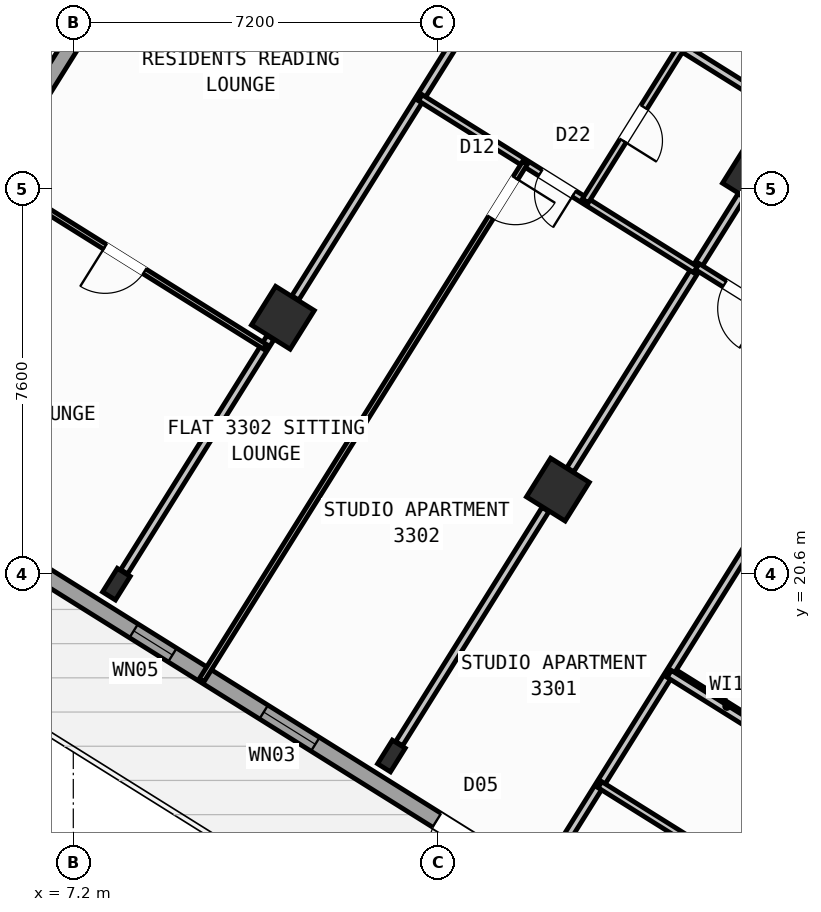
"""IFC4 building model, lengths in metres.
Left out: names, types, materials, properties, quantities, classifications, styles, units other than length and angle.
Written with IfcOpenShell. Run it as: python <this file> out.ifc"""

import sys

from ifc_helpers import new_model, si_unit, direction, frame, frame_2d, origin, origin_2d, place, context, subcontext, project, spatial, rectangle, hollow_rectangle, i_section, extrude, source, transform, mapped, element, fill, save


model = new_model("IFC4")
c1 = context("Model", 3, precision=1e-05, world=origin(), true_north=direction((0.0, 1.0)))
c2 = subcontext(c1, "Body", "Model", "MODEL_VIEW")
j1 = project(units=[si_unit("LENGTHUNIT", "METRE"), si_unit("PLANEANGLEUNIT", "RADIAN")], contexts=[c1])
p1 = place(None, origin())
s1 = spatial("IfcSite", under=j1, at=p1, CompositionType="ELEMENT")
p2 = place(p1, origin())
s2 = spatial("IfcBuilding", under=s1, at=p2, CompositionType="ELEMENT")
p3 = place(p2, frame((0.0, 0.0, 132.6)))
s3 = spatial("IfcBuildingStorey", under=s2, at=p3, CompositionType="ELEMENT", Elevation=132.6)
m1 = source(origin(), c2, "Body", "SweptSolid", [
    extrude(hollow_rectangle(XDim=0.9, YDim=0.9, WallThickness=0.036, at=origin_2d()), origin(), (0.0, 0.0, 1.0), 3.6),
])
for number, where, z_axis, x_axis in (
    (1, (20.632, 28.452, 0.0), (0.0, 0.0, 1.0), (-0.848, 0.53, 0.0)),
    (2, (16.764, 22.261, 0.0), (0.0, 0.0, 1.0), (-0.848, 0.53, 0.0)),
):
    element("IfcColumn", number, at=place(p3, frame(where, z_axis=z_axis, x_axis=x_axis)), inside=s3, PredefinedType="COLUMN", context=c2, shape_type="MappedRepresentation", body=[
        mapped(m1, transform((0.0, 0.0, 0.0), scale=1.0)),
    ])
m2 = source(origin(), c2, "Body", "SweptSolid", [
    extrude(i_section(OverallWidth=0.3, OverallDepth=0.55, WebThickness=0.015, FlangeThickness=0.029, at=origin_2d()), origin(), (0.0, 0.0, 1.0), 3.6),
])
p4 = place(p3, frame((13.478, 17.003, 0.0), z_axis=(0.0, 0.0, 1.0), x_axis=(-0.848048096156, 0.529919264233, 0.0)))
e3 = element("IfcColumn", 3, at=p4, inside=s3, PredefinedType="COLUMN", context=c2, shape_type="MappedRepresentation", body=[
    mapped(m2, transform((0.0, 0.0, 0.0), scale=1.0)),
])
p5 = place(p3, frame((11.336, 25.653, 0.0), z_axis=(0.0, 0.0, 1.0), x_axis=(-0.848048096156, 0.529919264233, 0.0)))
e4 = element("IfcColumn", 4, at=p5, inside=s3, PredefinedType="COLUMN", context=c2, shape_type="MappedRepresentation", body=[
    mapped(m1, transform((0.0, 0.0, 0.0), scale=1.0)),
])
p6 = place(p3, frame((8.051, 20.395, 0.0), z_axis=(0.0, 0.0, 1.0), x_axis=(-0.848048096156, 0.529919264233, 0.0)))
e5 = element("IfcColumn", 5, at=p6, inside=s3, PredefinedType="COLUMN", context=c2, shape_type="MappedRepresentation", body=[
    mapped(m2, transform((0.0, 0.0, 0.0), scale=1.0)),
])
p7 = place(p3, frame((29.268, 6.429, 0.0), z_axis=(0.0, 0.0, 1.0), x_axis=(-0.848049971435, 0.529916263149, 0.0)))
e6 = element("IfcWall", 6, at=p7, inside=s3, PredefinedType="STANDARD", context=c2, shape_type="SweptSolid", body=[
    extrude(rectangle(XDim=31.588, YDim=0.32, at=frame_2d((15.794, 0.0))), origin(), (0.0, 0.0, 1.0), 3.32),
])
p8 = place(p7, frame((16.362, 0.0, 0.0)))
e7 = element("IfcOpeningElement", 7, at=p8, cuts=e6, PredefinedType="OPENING", context=c2, shape_type="SweptSolid", body=[
    extrude(rectangle(XDim=1.2, YDim=2.15, at=frame_2d((0.6, 1.075))), frame((0.0, 0.17, 0.0), z_axis=(0.0, -1.0, 0.0), x_axis=(1.0, 0.0, 0.0)), (0.0, 0.0, 1.0), 0.34),
])
p9 = place(p7, frame((2.989, 0.0, 0.8)))
e8 = element("IfcOpeningElement", 8, at=p9, cuts=e6, PredefinedType="OPENING", context=c2, shape_type="SweptSolid", body=[
    extrude(rectangle(XDim=2.1, YDim=1.55, at=frame_2d((1.05, 0.775))), frame((0.0, 0.17, 0.0), z_axis=(0.0, -1.0, 0.0), x_axis=(1.0, 0.0, 0.0)), (0.0, 0.0, 1.0), 0.34),
])
p10 = place(p7, frame((8.359, 0.0, 0.8)))
e9 = element("IfcOpeningElement", 9, at=p10, cuts=e6, PredefinedType="OPENING", context=c2, shape_type="SweptSolid", body=[
    extrude(rectangle(XDim=2.1, YDim=1.55, at=frame_2d((1.05, 0.775))), frame((0.0, 0.17, 0.0), z_axis=(0.0, -1.0, 0.0), x_axis=(1.0, 0.0, 0.0)), (0.0, 0.0, 1.0), 0.34),
])
p11 = place(p7, frame((13.284, 0.0, 0.95)))
e10 = element("IfcOpeningElement", 10, at=p11, cuts=e6, PredefinedType="OPENING", context=c2, shape_type="SweptSolid", body=[
    extrude(rectangle(XDim=1.2, YDim=1.4, at=frame_2d((0.6, 0.7))), frame((0.0, 0.17, 0.0), z_axis=(0.0, -1.0, 0.0), x_axis=(1.0, 0.0, 0.0)), (0.0, 0.0, 1.0), 0.34),
])
p12 = place(p7, frame((20.39, 0.0, 0.95)))
e11 = element("IfcOpeningElement", 11, at=p12, cuts=e6, PredefinedType="OPENING", context=c2, shape_type="SweptSolid", body=[
    extrude(rectangle(XDim=1.2, YDim=1.4, at=frame_2d((0.6, 0.7))), frame((0.0, 0.17, 0.0), z_axis=(0.0, -1.0, 0.0), x_axis=(1.0, 0.0, 0.0)), (0.0, 0.0, 1.0), 0.34),
])
p13 = place(p7, frame((23.715, 0.0, 1.0)))
e12 = element("IfcOpeningElement", 12, at=p13, cuts=e6, PredefinedType="OPENING", context=c2, shape_type="SweptSolid", body=[
    extrude(rectangle(XDim=0.9, YDim=1.25, at=frame_2d((0.45, 0.625))), frame((0.0, 0.17, 0.0), z_axis=(0.0, -1.0, 0.0), x_axis=(1.0, 0.0, 0.0)), (0.0, 0.0, 1.0), 0.34),
])
p14 = place(p7, frame((27.481, 0.0, 0.8)))
e13 = element("IfcOpeningElement", 13, at=p14, cuts=e6, PredefinedType="OPENING", context=c2, shape_type="SweptSolid", body=[
    extrude(rectangle(XDim=2.1, YDim=1.55, at=frame_2d((1.05, 0.775))), frame((0.0, 0.17, 0.0), z_axis=(0.0, -1.0, 0.0), x_axis=(1.0, 0.0, 0.0)), (0.0, 0.0, 1.0), 0.34),
])
p15 = place(p3, frame((2.415, 23.452, 0.0), z_axis=(0.0, 0.0, 1.0), x_axis=(0.52991049553, 0.848053575387, 0.0)))
e14 = element("IfcWall", 14, at=p15, inside=s3, PredefinedType="STANDARD", context=c2, shape_type="SweptSolid", body=[
    extrude(rectangle(XDim=21.587, YDim=0.32, at=frame_2d((10.794, 0.0))), origin(), (0.0, 0.0, 1.0), 2.745),
])
p16 = place(p15, frame((2.168, 0.0, 0.8)))
e15 = element("IfcOpeningElement", 15, at=p16, cuts=e14, PredefinedType="OPENING", context=c2, shape_type="SweptSolid", body=[
    extrude(rectangle(XDim=2.1, YDim=1.55, at=frame_2d((1.05, 0.775))), frame((0.0, 0.17, 0.0), z_axis=(0.0, -1.0, 0.0), x_axis=(1.0, 0.0, 0.0)), (0.0, 0.0, 1.0), 0.34),
])
p17 = place(p15, frame((9.344, 0.0, 0.85)))
e16 = element("IfcOpeningElement", 16, at=p17, cuts=e14, PredefinedType="OPENING", context=c2, shape_type="SweptSolid", body=[
    extrude(rectangle(XDim=1.8, YDim=1.5, at=frame_2d((0.9, 0.75))), frame((0.0, 0.17, 0.0), z_axis=(0.0, -1.0, 0.0), x_axis=(1.0, 0.0, 0.0)), (0.0, 0.0, 1.0), 0.34),
])
p18 = place(p15, frame((18.459, 0.0, 0.85)))
e17 = element("IfcOpeningElement", 17, at=p18, cuts=e14, PredefinedType="OPENING", context=c2, shape_type="SweptSolid", body=[
    extrude(rectangle(XDim=1.5, YDim=1.5, at=frame_2d((0.75, 0.75))), frame((0.0, 0.17, 0.0), z_axis=(0.0, -1.0, 0.0), x_axis=(1.0, 0.0, 0.0)), (0.0, 0.0, 1.0), 0.34),
])
p19 = place(p3, frame((14.138, 41.825, 0.0), z_axis=(0.0, 0.0, 1.0), x_axis=(0.848046498049, -0.529921821731, 0.0)))
e18 = element("IfcWall", 18, at=p19, inside=s3, PredefinedType="STANDARD", context=c2, shape_type="SweptSolid", body=[
    extrude(rectangle(XDim=31.588, YDim=0.32, at=frame_2d((15.794, 0.0))), origin(), (0.0, 0.0, 1.0), 3.32),
])
p20 = place(p19, frame((3.253, 0.0, 0.0)))
e19 = element("IfcOpeningElement", 19, at=p20, cuts=e18, PredefinedType="OPENING", context=c2, shape_type="SweptSolid", body=[
    extrude(rectangle(XDim=1.05, YDim=2.15, at=frame_2d((0.525, 1.075))), frame((0.0, 0.17, 0.0), z_axis=(0.0, -1.0, 0.0), x_axis=(1.0, 0.0, 0.0)), (0.0, 0.0, 1.0), 0.34),
])
p21 = place(p19, frame((0.863, 0.0, 0.85)))
e20 = element("IfcOpeningElement", 20, at=p21, cuts=e18, PredefinedType="OPENING", context=c2, shape_type="SweptSolid", body=[
    extrude(rectangle(XDim=1.8, YDim=1.5, at=frame_2d((0.9, 0.75))), frame((0.0, 0.17, 0.0), z_axis=(0.0, -1.0, 0.0), x_axis=(1.0, 0.0, 0.0)), (0.0, 0.0, 1.0), 0.34),
])
p22 = place(p19, frame((8.435, 0.0, 0.85)))
e21 = element("IfcOpeningElement", 21, at=p22, cuts=e18, PredefinedType="OPENING", context=c2, shape_type="SweptSolid", body=[
    extrude(rectangle(XDim=1.8, YDim=1.5, at=frame_2d((0.9, 0.75))), frame((0.0, 0.17, 0.0), z_axis=(0.0, -1.0, 0.0), x_axis=(1.0, 0.0, 0.0)), (0.0, 0.0, 1.0), 0.34),
])
p23 = place(p19, frame((13.874, 0.0, 0.85)))
e22 = element("IfcOpeningElement", 22, at=p23, cuts=e18, PredefinedType="OPENING", context=c2, shape_type="SweptSolid", body=[
    extrude(rectangle(XDim=1.5, YDim=1.5, at=frame_2d((0.75, 0.75))), frame((0.0, 0.17, 0.0), z_axis=(0.0, -1.0, 0.0), x_axis=(1.0, 0.0, 0.0)), (0.0, 0.0, 1.0), 0.34),
])
p24 = place(p19, frame((17.104, 0.0, 1.0)))
e23 = element("IfcOpeningElement", 23, at=p24, cuts=e18, PredefinedType="OPENING", context=c2, shape_type="SweptSolid", body=[
    extrude(rectangle(XDim=0.9, YDim=1.25, at=frame_2d((0.45, 0.625))), frame((0.0, 0.17, 0.0), z_axis=(0.0, -1.0, 0.0), x_axis=(1.0, 0.0, 0.0)), (0.0, 0.0, 1.0), 0.34),
])
p25 = place(p19, frame((22.131, 0.0, 1.0)))
e24 = element("IfcOpeningElement", 24, at=p25, cuts=e18, PredefinedType="OPENING", context=c2, shape_type="SweptSolid", body=[
    extrude(rectangle(XDim=0.9, YDim=1.25, at=frame_2d((0.45, 0.625))), frame((0.0, 0.17, 0.0), z_axis=(0.0, -1.0, 0.0), x_axis=(1.0, 0.0, 0.0)), (0.0, 0.0, 1.0), 0.34),
])
p26 = place(p19, frame((27.706, 0.0, 1.0)))
e25 = element("IfcOpeningElement", 25, at=p26, cuts=e18, PredefinedType="OPENING", context=c2, shape_type="SweptSolid", body=[
    extrude(rectangle(XDim=0.9, YDim=1.25, at=frame_2d((0.45, 0.625))), frame((0.0, 0.17, 0.0), z_axis=(0.0, -1.0, 0.0), x_axis=(1.0, 0.0, 0.0)), (0.0, 0.0, 1.0), 0.34),
])
p27 = place(p3, frame((21.206, 17.292, 0.0), z_axis=(0.0, 0.0, 1.0), x_axis=(-0.848050851465, 0.529914854792, 0.0)))
e26 = element("IfcWall", 26, at=p27, inside=s3, PredefinedType="PARTITIONING", context=c2, shape_type="SweptSolid", body=[
    extrude(rectangle(XDim=2.61, YDim=0.16, at=frame_2d((1.305, 0.0))), origin(), (0.0, 0.0, 1.0), 3.31),
])
p28 = place(p3, frame((24.588, 27.631, 0.0), z_axis=(0.0, 0.0, 1.0), x_axis=(-0.529914586043, -0.848051019396, 0.0)))
e27 = element("IfcWall", 27, at=p28, inside=s3, PredefinedType="PARTITIONING", context=c2, shape_type="SweptSolid", body=[
    extrude(rectangle(XDim=15.35, YDim=0.16, at=frame_2d((7.675, 0.0))), origin(), (0.0, 0.0, 1.0), 3.31),
])
p29 = place(p3, frame((25.754, 29.497, 0.0), z_axis=(0.0, 0.0, 1.0), x_axis=(-0.848045850158, 0.529922858565, 0.0)))
e28 = element("IfcWall", 28, at=p29, inside=s3, PredefinedType="PARTITIONING", context=c2, shape_type="SweptSolid", body=[
    extrude(rectangle(XDim=16.73, YDim=0.16, at=frame_2d((8.365, 0.0))), origin(), (0.0, 0.0, 1.0), 3.31),
])
p30 = place(p29, frame((1.588, 0.0, 0.0)))
e29 = element("IfcOpeningElement", 29, at=p30, cuts=e28, PredefinedType="OPENING", context=c2, shape_type="SweptSolid", body=[
    extrude(rectangle(XDim=1.0, YDim=2.1, at=frame_2d((0.5, 1.05))), frame((0.0, 0.09, 0.0), z_axis=(0.0, -1.0, 0.0), x_axis=(1.0, 0.0, 0.0)), (0.0, 0.0, 1.0), 0.18),
])
p31 = place(p29, frame((6.685, 0.0, 0.0)))
e30 = element("IfcOpeningElement", 30, at=p31, cuts=e28, PredefinedType="OPENING", context=c2, shape_type="SweptSolid", body=[
    extrude(rectangle(XDim=1.0, YDim=2.1, at=frame_2d((0.5, 1.05))), frame((0.0, 0.09, 0.0), z_axis=(0.0, -1.0, 0.0), x_axis=(1.0, 0.0, 0.0)), (0.0, 0.0, 1.0), 0.18),
])
p32 = place(p29, frame((12.951, 0.0, 0.0)))
e31 = element("IfcOpeningElement", 31, at=p32, cuts=e28, PredefinedType="OPENING", context=c2, shape_type="SweptSolid", body=[
    extrude(rectangle(XDim=1.0, YDim=2.1, at=frame_2d((0.5, 1.05))), frame((0.0, 0.09, 0.0), z_axis=(0.0, -1.0, 0.0), x_axis=(1.0, 0.0, 0.0)), (0.0, 0.0, 1.0), 0.18),
])
p33 = place(p3, frame((24.588, 27.631, 0.0), z_axis=(0.0, 0.0, 1.0), x_axis=(-0.848041752158, 0.529929416617, 0.0)))
e32 = element("IfcWall", 32, at=p33, inside=s3, PredefinedType="PARTITIONING", context=c2, shape_type="SweptSolid", body=[
    extrude(rectangle(XDim=16.73, YDim=0.16, at=frame_2d((8.365, 0.0))), origin(), (0.0, 0.0, 1.0), 3.31),
])
p34 = place(p33, frame((2.22, 0.0, 0.0)))
e33 = element("IfcOpeningElement", 33, at=p34, cuts=e32, PredefinedType="OPENING", context=c2, shape_type="SweptSolid", body=[
    extrude(rectangle(XDim=0.86, YDim=2.05, at=frame_2d((0.43, 1.025))), frame((0.0, 0.09, 0.0), z_axis=(0.0, -1.0, 0.0), x_axis=(1.0, 0.0, 0.0)), (0.0, 0.0, 1.0), 0.18),
])
p35 = place(p33, frame((7.82, 0.0, 0.0)))
e34 = element("IfcOpeningElement", 34, at=p35, cuts=e32, PredefinedType="OPENING", context=c2, shape_type="SweptSolid", body=[
    extrude(rectangle(XDim=1.0, YDim=2.1, at=frame_2d((0.5, 1.05))), frame((0.0, 0.09, 0.0), z_axis=(0.0, -1.0, 0.0), x_axis=(1.0, 0.0, 0.0)), (0.0, 0.0, 1.0), 0.18),
])
p36 = place(p33, frame((12.95, 0.0, 0.0)))
e35 = element("IfcOpeningElement", 35, at=p36, cuts=e32, PredefinedType="OPENING", context=c2, shape_type="SweptSolid", body=[
    extrude(rectangle(XDim=1.0, YDim=2.1, at=frame_2d((0.5, 1.05))), frame((0.0, 0.09, 0.0), z_axis=(0.0, -1.0, 0.0), x_axis=(1.0, 0.0, 0.0)), (0.0, 0.0, 1.0), 0.18),
])
p37 = place(p3, frame((20.387, 28.06, 0.0), z_axis=(0.0, 0.0, 1.0), x_axis=(-0.529902564924, -0.848058530814, 0.0)))
e36 = element("IfcWall", 36, at=p37, inside=s3, PredefinedType="PARTITIONING", context=c2, shape_type="SweptSolid", body=[
    extrude(rectangle(XDim=6.376, YDim=0.16, at=frame_2d((3.188, 0.0))), origin(), (0.0, 0.0, 1.0), 2.745),
])
p38 = place(p3, frame((16.519, 21.87, 0.0), z_axis=(0.0, 0.0, 1.0), x_axis=(-0.529922447305, -0.848046107144, 0.0)))
e37 = element("IfcWall", 37, at=p38, inside=s3, PredefinedType="PARTITIONING", context=c2, shape_type="SweptSolid", body=[
    extrude(rectangle(XDim=5.451, YDim=0.16, at=frame_2d((2.726, 0.0))), origin(), (0.0, 0.0, 1.0), 2.745),
])
p39 = place(p3, frame((22.728, 24.654, 0.0), z_axis=(0.0, 0.0, 1.0), x_axis=(-0.848059820872, 0.529900500304, 0.0)))
e38 = element("IfcWall", 38, at=p39, inside=s3, PredefinedType="PLUMBINGWALL", context=c2, shape_type="SweptSolid", body=[
    extrude(rectangle(XDim=3.79, YDim=0.14, at=frame_2d((1.895, 0.0))), origin(), (0.0, 0.0, 1.0), 3.31),
])
p40 = place(p39, frame((2.23, 0.0, 0.0)))
e39 = element("IfcOpeningElement", 39, at=p40, cuts=e38, PredefinedType="OPENING", context=c2, shape_type="SweptSolid", body=[
    extrude(rectangle(XDim=0.92, YDim=2.08, at=frame_2d((0.46, 1.04))), frame((0.0, 0.08, 0.0), z_axis=(0.0, -1.0, 0.0), x_axis=(1.0, 0.0, 0.0)), (0.0, 0.0, 1.0), 0.16),
])
p41 = place(p3, frame((14.96, 31.452, 0.0), z_axis=(0.0, 0.0, 1.0), x_axis=(-0.529947310719, -0.848030570122, 0.0)))
e40 = element("IfcWall", 40, at=p41, inside=s3, PredefinedType="PARTITIONING", context=c2, shape_type="SweptSolid", body=[
    extrude(rectangle(XDim=6.376, YDim=0.16, at=frame_2d((3.188, 0.0))), origin(), (0.0, 0.0, 1.0), 2.745),
])
p42 = place(p3, frame((11.091, 25.261, 0.0), z_axis=(0.0, 0.0, 1.0), x_axis=(-0.52994257524, -0.848033529377, 0.0)))
e41 = element("IfcWall", 41, at=p42, inside=s3, PredefinedType="PARTITIONING", context=c2, shape_type="SweptSolid", body=[
    extrude(rectangle(XDim=5.451, YDim=0.16, at=frame_2d((2.726, 0.0))), origin(), (0.0, 0.0, 1.0), 2.745),
])
p43 = place(p3, frame((19.477, 26.603, 0.0), z_axis=(0.0, 0.0, 1.0), x_axis=(-0.848039019877, 0.529933789039, 0.0)))
e42 = element("IfcWall", 42, at=p43, inside=s3, PredefinedType="PLUMBINGWALL", context=c2, shape_type="SweptSolid", body=[
    extrude(rectangle(XDim=6.4, YDim=0.14, at=frame_2d((3.2, 0.0))), origin(), (0.0, 0.0, 1.0), 3.31),
])
p44 = place(p43, frame((2.824, 0.0, 0.0)))
e43 = element("IfcOpeningElement", 43, at=p44, cuts=e42, PredefinedType="OPENING", context=c2, shape_type="SweptSolid", body=[
    extrude(rectangle(XDim=0.78, YDim=2.05, at=frame_2d((0.39, 1.025))), frame((0.0, 0.08, 0.0), z_axis=(0.0, -1.0, 0.0), x_axis=(1.0, 0.0, 0.0)), (0.0, 0.0, 1.0), 0.16),
])
p45 = place(p3, frame((19.203, 30.996, 0.0), z_axis=(0.0, 0.0, 1.0), x_axis=(-0.529906983049, -0.848055770169, 0.0)))
e44 = element("IfcWall", 44, at=p45, inside=s3, PredefinedType="PLUMBINGWALL", context=c2, shape_type="SweptSolid", body=[
    extrude(rectangle(XDim=3.58, YDim=0.14, at=frame_2d((1.79, 0.0))), origin(), (0.0, 0.0, 1.0), 3.31),
])
p46 = place(p45, frame((1.4, 0.0, 0.0)))
e45 = element("IfcOpeningElement", 45, at=p46, cuts=e44, PredefinedType="OPENING", context=c2, shape_type="SweptSolid", body=[
    extrude(rectangle(XDim=0.78, YDim=2.05, at=frame_2d((0.39, 1.025))), frame((0.0, 0.08, 0.0), z_axis=(0.0, -1.0, 0.0), x_axis=(1.0, 0.0, 0.0)), (0.0, 0.0, 1.0), 0.16),
])
p47 = place(p3, frame((16.112, 28.706, 0.0), z_axis=(0.0, 0.0, 1.0), x_axis=(-0.529929676091, -0.848041590017, 0.0)))
e46 = element("IfcWall", 46, at=p47, inside=s3, PredefinedType="PARTITIONING", context=c2, shape_type="SweptSolid", body=[
    extrude(rectangle(XDim=12.04, YDim=0.11, at=frame_2d((6.02, 0.0))), origin(), (0.0, 0.0, 1.0), 3.31),
])
p48 = place(p47, frame((0.35, 0.0, 0.0)))
e47 = element("IfcOpeningElement", 47, at=p48, cuts=e46, PredefinedType="OPENING", context=c2, shape_type="SweptSolid", body=[
    extrude(rectangle(XDim=0.92, YDim=2.08, at=frame_2d((0.46, 1.04))), frame((0.0, 0.065, 0.0), z_axis=(0.0, -1.0, 0.0), x_axis=(1.0, 0.0, 0.0)), (0.0, 0.0, 1.0), 0.13),
])
p49 = place(p3, frame((10.98, 25.083, 0.0), z_axis=(0.0, 0.0, 1.0), x_axis=(-0.848048787466, 0.529918157905, 0.0)))
e48 = element("IfcWall", 48, at=p49, inside=s3, PredefinedType="PARTITIONING", context=c2, shape_type="SweptSolid", body=[
    extrude(rectangle(XDim=6.52, YDim=0.11, at=frame_2d((3.26, 0.0))), origin(), (0.0, 0.0, 1.0), 3.31),
])
p50 = place(p49, frame((2.8, 0.0, 0.0)))
e49 = element("IfcOpeningElement", 49, at=p50, cuts=e48, PredefinedType="OPENING", context=c2, shape_type="SweptSolid", body=[
    extrude(rectangle(XDim=0.92, YDim=2.08, at=frame_2d((0.46, 1.04))), frame((0.0, 0.065, 0.0), z_axis=(0.0, -1.0, 0.0), x_axis=(1.0, 0.0, 0.0)), (0.0, 0.0, 1.0), 0.13),
])
p51 = place(p3, frame((32.164, 10.374, 0.0), z_axis=(0.0, 0.0, 1.0), x_axis=(-0.848044107957, 0.529925646633, 0.0)))
e50 = element("IfcWall", 50, at=p51, inside=s3, PredefinedType="PARTITIONING", context=c2, shape_type="SweptSolid", body=[
    extrude(rectangle(XDim=15.57, YDim=0.16, at=frame_2d((7.785, 0.0))), origin(), (0.0, 0.0, 1.0), 3.31),
])
p52 = place(p51, frame((10.83, 0.0, 0.0)))
e51 = element("IfcOpeningElement", 51, at=p52, cuts=e50, PredefinedType="OPENING", context=c2, shape_type="SweptSolid", body=[
    extrude(rectangle(XDim=1.0, YDim=2.1, at=frame_2d((0.5, 1.05))), frame((0.0, 0.09, 0.0), z_axis=(0.0, -1.0, 0.0), x_axis=(1.0, 0.0, 0.0)), (0.0, 0.0, 1.0), 0.18),
])
p53 = place(p3, frame((29.72, 8.859, 0.0), z_axis=(0.0, 0.0, 1.0), x_axis=(-0.848049134363, 0.529917602752, 0.0)))
e52 = element("IfcWall", 52, at=p53, inside=s3, PredefinedType="PLUMBINGWALL", context=c2, shape_type="SweptSolid", body=[
    extrude(rectangle(XDim=14.3, YDim=0.14, at=frame_2d((7.15, 0.0))), origin(), (0.0, 0.0, 1.0), 3.31),
])
p54 = place(p53, frame((9.57, 0.0, 0.0)))
e53 = element("IfcOpeningElement", 53, at=p54, cuts=e52, PredefinedType="OPENING", context=c2, shape_type="SweptSolid", body=[
    extrude(rectangle(XDim=0.92, YDim=2.08, at=frame_2d((0.46, 1.04))), frame((0.0, 0.08, 0.0), z_axis=(0.0, -1.0, 0.0), x_axis=(1.0, 0.0, 0.0)), (0.0, 0.0, 1.0), 0.16),
])
m3 = source(origin(), c2, "Body", "SweptSolid", [
    extrude(rectangle(XDim=1.2, YDim=2.15, at=frame_2d((0.6, 1.075))), frame((0.0, 0.025, 0.0), z_axis=(0.0, -1.0, 0.0), x_axis=(1.0, 0.0, 0.0)), (0.0, 0.0, 1.0), 0.05),
])
p55 = place(p8, origin())
e54 = element("IfcDoor", 54, at=p55, inside=s3, OperationType="SINGLE_SWING_LEFT", PredefinedType="DOOR", context=c2, shape_type="MappedRepresentation", body=[
    mapped(m3, transform((0.0, 0.0, 0.0), scale=1.0)),
])
fill(e7, e54)
m4 = source(origin(), c2, "Body", "SweptSolid", [
    extrude(rectangle(XDim=1.2, YDim=1.4, at=frame_2d((0.6, 0.7))), frame((0.0, 0.03, 0.0), z_axis=(0.0, -1.0, 0.0), x_axis=(1.0, 0.0, 0.0)), (0.0, 0.0, 1.0), 0.06),
])
p56 = place(p12, origin())
e55 = element("IfcWindow", 55, at=p56, inside=s3, PartitioningType="SINGLE_PANEL", PredefinedType="WINDOW", context=c2, shape_type="MappedRepresentation", body=[
    mapped(m4, transform((0.0, 0.0, 0.0), scale=1.0)),
])
fill(e11, e55)
m5 = source(origin(), c2, "Body", "SweptSolid", [
    extrude(rectangle(XDim=0.9, YDim=1.25, at=frame_2d((0.45, 0.625))), frame((0.0, 0.03, 0.0), z_axis=(0.0, -1.0, 0.0), x_axis=(1.0, 0.0, 0.0)), (0.0, 0.0, 1.0), 0.06),
])
p57 = place(p13, origin())
e56 = element("IfcWindow", 56, at=p57, inside=s3, PartitioningType="SINGLE_PANEL", PredefinedType="WINDOW", context=c2, shape_type="MappedRepresentation", body=[
    mapped(m5, transform((0.0, 0.0, 0.0), scale=1.0)),
])
fill(e12, e56)
m6 = source(origin(), c2, "Body", "SweptSolid", [
    extrude(rectangle(XDim=0.92, YDim=2.08, at=frame_2d((0.46, 1.04))), frame((0.0, 0.025, 0.0), z_axis=(0.0, -1.0, 0.0), x_axis=(1.0, 0.0, 0.0)), (0.0, 0.0, 1.0), 0.05),
])
p58 = place(p40, origin())
e57 = element("IfcDoor", 57, at=p58, inside=s3, OperationType="SINGLE_SWING_LEFT", PredefinedType="DOOR", context=c2, shape_type="MappedRepresentation", body=[
    mapped(m6, transform((0.0, 0.0, 0.0), scale=1.0)),
])
fill(e39, e57)
p59 = place(p48, origin())
e58 = element("IfcDoor", 58, at=p59, inside=s3, OperationType="SINGLE_SWING_LEFT", PredefinedType="DOOR", context=c2, shape_type="MappedRepresentation", body=[
    mapped(m6, transform((0.0, 0.0, 0.0), scale=1.0)),
])
fill(e47, e58)
m7 = source(origin(), c2, "Body", "SweptSolid", [
    extrude(rectangle(XDim=0.78, YDim=2.05, at=frame_2d((0.39, 1.025))), frame((0.0, 0.025, 0.0), z_axis=(0.0, -1.0, 0.0), x_axis=(1.0, 0.0, 0.0)), (0.0, 0.0, 1.0), 0.05),
])
p60 = place(p44, origin())
e59 = element("IfcDoor", 59, at=p60, inside=s3, OperationType="SINGLE_SWING_LEFT", PredefinedType="DOOR", context=c2, shape_type="MappedRepresentation", body=[
    mapped(m7, transform((0.0, 0.0, 0.0), scale=1.0)),
])
fill(e43, e59)
p61 = place(p46, origin())
e60 = element("IfcDoor", 60, at=p61, inside=s3, OperationType="SINGLE_SWING_RIGHT", PredefinedType="DOOR", context=c2, shape_type="MappedRepresentation", body=[
    mapped(m7, transform((0.0, 0.0, 0.0), scale=1.0)),
])
fill(e45, e60)
p62 = place(p50, origin())
e61 = element("IfcDoor", 61, at=p62, inside=s3, OperationType="SINGLE_SWING_RIGHT", PredefinedType="DOOR", context=c2, shape_type="MappedRepresentation", body=[
    mapped(m6, transform((0.0, 0.0, 0.0), scale=1.0)),
])
fill(e49, e61)
save(model, sys.argv[1])
